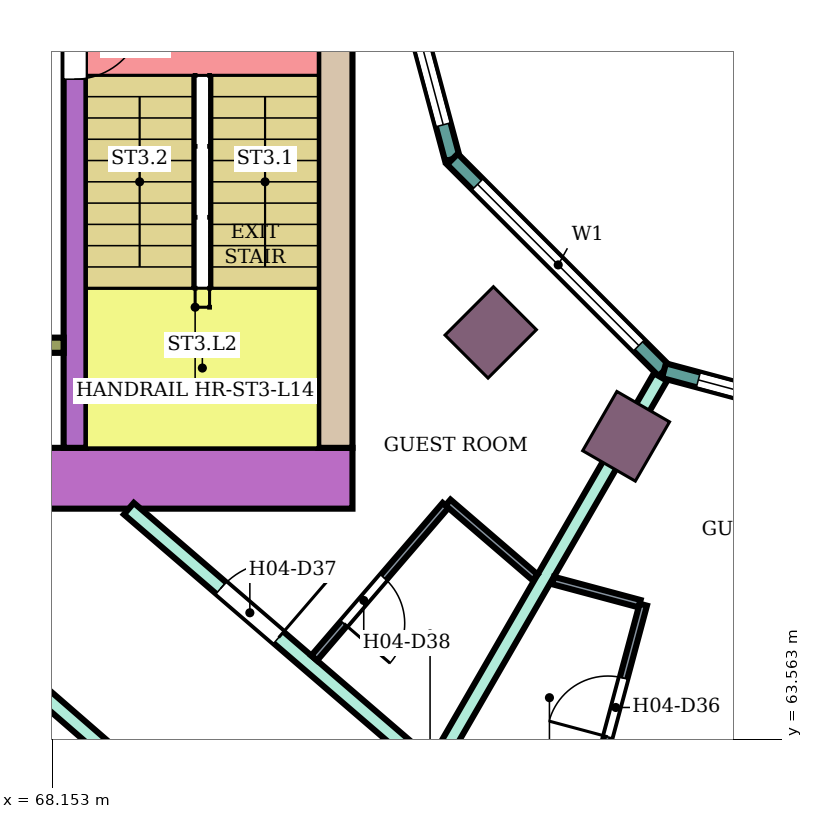
"""IFC4 building model, lengths in metres.
Left out: names, types, materials, properties, quantities, classifications, styles, units other than length and angle.
Written with IfcOpenShell. Run it as: python <this file> out.ifc"""

import sys

from ifc_helpers import new_model, si_unit, direction, frame, frame_2d, origin, origin_2d, place, context, subcontext, project, spatial, rectangle, extrude, element, fill, save


model = new_model("IFC4")
c1 = context("Model", 3, precision=1e-05, world=origin(), true_north=direction((0.0, 1.0)))
c2 = subcontext(c1, "Body", "Model", "MODEL_VIEW")
j1 = project(units=[si_unit("LENGTHUNIT", "METRE"), si_unit("PLANEANGLEUNIT", "RADIAN")], contexts=[c1])
p1 = place(None, origin())
s1 = spatial("IfcSite", under=j1, at=p1, CompositionType="ELEMENT")
p2 = place(p1, origin())
s2 = spatial("IfcBuilding", under=s1, at=p2, CompositionType="ELEMENT")
p3 = place(p2, frame((0.0, 0.0, 63.0)))
s3 = spatial("IfcBuildingStorey", under=s2, at=p3, CompositionType="ELEMENT", Elevation=63.0)
for number, where, z_axis, x_axis in (
    (1, (73.919, 68.919, 0.0), (0.0, 0.0, 1.0), (-0.707, -0.707, 0.0)),
    (2, (75.7, 67.552, 0.0), (0.0, 0.0, 1.0), (-0.5, -0.866, 0.0)),
):
    element("IfcColumn", number, at=place(p3, frame(where, z_axis=z_axis, x_axis=x_axis)), inside=s3, PredefinedType="COLUMN", context=c2, shape_type="SweptSolid", body=[
        extrude(rectangle(XDim=0.9, YDim=0.8, at=origin_2d()), origin(), (0.0, 0.0, 1.0), 3.8),
    ])
p4 = place(p3, frame((72.1, 67.0, 0.0), z_axis=(0.0, 0.0, 1.0), x_axis=(-1.0, 0.0, 0.0)))
e3 = element("IfcWall", 3, at=p4, inside=s3, PredefinedType="SHEAR", context=c2, shape_type="SweptSolid", body=[
    extrude(rectangle(XDim=14.7, YDim=0.8, at=frame_2d((7.35, 0.0))), origin(), (0.0, 0.0, 1.0), 3.48),
])
p5 = place(p4, frame((4.2, 0.0, 0.0)))
e4 = element("IfcOpeningElement", 4, at=p5, cuts=e3, PredefinedType="OPENING", context=c2, shape_type="SweptSolid", body=[
    extrude(rectangle(XDim=2.4, YDim=2.4, at=frame_2d((1.2, 1.2))), frame((0.0, 0.41, 0.0), z_axis=(0.0, -1.0, 0.0), x_axis=(1.0, 0.0, 0.0)), (0.0, 0.0, 1.0), 0.82),
])
p6 = place(p3, frame((71.875, 75.0, 0.0), z_axis=(0.0, 0.0, 1.0), x_axis=(0.0, -1.0, 0.0)))
e5 = element("IfcWall", 5, at=p6, inside=s3, PredefinedType="SHEAR", context=c2, shape_type="SweptSolid", body=[
    extrude(rectangle(XDim=7.6, YDim=0.45, at=frame_2d((3.8, 0.0))), origin(), (0.0, 0.0, 1.0), 3.48),
])
p7 = place(p3, frame((68.45, 75.0, 0.0), z_axis=(0.0, 0.0, 1.0), x_axis=(0.0, -1.0, 0.0)))
e6 = element("IfcWall", 6, at=p7, inside=s3, PredefinedType="SHEAR", context=c2, shape_type="SweptSolid", body=[
    extrude(rectangle(XDim=7.6, YDim=0.3, at=frame_2d((3.8, 0.0))), origin(), (0.0, 0.0, 1.0), 3.48),
])
p8 = place(p7, frame((1.85, 0.0, 0.0)))
e7 = element("IfcOpeningElement", 7, at=p8, cuts=e6, PredefinedType="OPENING", context=c2, shape_type="SweptSolid", body=[
    extrude(rectangle(XDim=0.9, YDim=2.1, at=frame_2d((0.45, 1.05))), frame((0.0, 0.16, 0.0), z_axis=(0.0, -1.0, 0.0), x_axis=(1.0, 0.0, 0.0)), (0.0, 0.0, 1.0), 0.32),
])
p9 = place(p3, frame((68.3, 68.75, 0.0), z_axis=(0.0, 0.0, 1.0), x_axis=(-1.0, 0.0, 0.0)))
e8 = element("IfcWall", 8, at=p9, inside=s3, PredefinedType="SHEAR", context=c2, shape_type="SweptSolid", body=[
    extrude(rectangle(XDim=4.65, YDim=0.2, at=frame_2d((2.325, 0.0))), origin(), (0.0, 0.0, 1.0), 3.48),
])
p10 = place(p3, frame((72.396, 75.0, 0.0), z_axis=(0.0, 0.0, 1.0), x_axis=(0.258789828301, -0.965933654434, 0.0)))
e9 = element("IfcWall", 9, at=p10, inside=s3, PredefinedType="NOTDEFINED", context=c2, shape_type="SweptSolid", body=[
    extrude(rectangle(XDim=3.936, YDim=0.2, at=frame_2d((1.968, 0.0))), origin(), (0.0, 0.0, 1.0), 3.8),
])
p11 = place(p10, frame((0.468, 0.0, 0.9)))
e10 = element("IfcOpeningElement", 10, at=p11, cuts=e9, PredefinedType="OPENING", context=c2, shape_type="SweptSolid", body=[
    extrude(rectangle(XDim=3.0, YDim=2.3, at=frame_2d((1.5, 1.15))), frame((0.0, 0.11, 0.0), z_axis=(0.0, -1.0, 0.0), x_axis=(1.0, 0.0, 0.0)), (0.0, 0.0, 1.0), 0.22),
])
p12 = place(p3, frame((73.415, 71.198, 0.0), z_axis=(0.0, 0.0, 1.0), x_axis=(0.707106781187, -0.707106781187, 0.0)))
e11 = element("IfcWall", 11, at=p12, inside=s3, PredefinedType="NOTDEFINED", context=c2, shape_type="SweptSolid", body=[
    extrude(rectangle(XDim=3.936, YDim=0.2, at=frame_2d((1.968, 0.0))), origin(), (0.0, 0.0, 1.0), 3.8),
])
p13 = place(p12, frame((0.468, 0.0, 0.9)))
e12 = element("IfcOpeningElement", 12, at=p13, cuts=e11, PredefinedType="OPENING", context=c2, shape_type="SweptSolid", body=[
    extrude(rectangle(XDim=3.0, YDim=2.3, at=frame_2d((1.5, 1.15))), frame((0.0, 0.11, 0.0), z_axis=(0.0, -1.0, 0.0), x_axis=(1.0, 0.0, 0.0)), (0.0, 0.0, 1.0), 0.22),
])
p14 = place(p3, frame((76.198, 68.415, 0.0), z_axis=(0.0, 0.0, 1.0), x_axis=(0.965933654434, -0.258789828301, 0.0)))
e13 = element("IfcWall", 13, at=p14, inside=s3, PredefinedType="NOTDEFINED", context=c2, shape_type="SweptSolid", body=[
    extrude(rectangle(XDim=3.936, YDim=0.2, at=frame_2d((1.968, 0.0))), origin(), (0.0, 0.0, 1.0), 3.8),
])
p15 = place(p14, frame((0.468, 0.0, 0.9)))
e14 = element("IfcOpeningElement", 14, at=p15, cuts=e13, PredefinedType="OPENING", context=c2, shape_type="SweptSolid", body=[
    extrude(rectangle(XDim=3.0, YDim=2.3, at=frame_2d((1.5, 1.15))), frame((0.0, 0.11, 0.0), z_axis=(0.0, -1.0, 0.0), x_axis=(1.0, 0.0, 0.0)), (0.0, 0.0, 1.0), 0.22),
])
p16 = place(p3, frame((66.924, 65.111, 0.0), z_axis=(0.0, 0.0, 1.0), x_axis=(0.755023669255, -0.655697536113, 0.0)))
e15 = element("IfcWall", 15, at=p16, inside=s3, PredefinedType="PARTITIONING", context=c2, shape_type="SweptSolid", body=[
    extrude(rectangle(XDim=6.396, YDim=0.2, at=frame_2d((3.198, 0.0))), origin(), (0.0, 0.0, 1.0), 3.35),
])
p17 = place(p16, frame((2.658, 0.0, 0.0)))
e16 = element("IfcOpeningElement", 16, at=p17, cuts=e15, PredefinedType="OPENING", context=c2, shape_type="SweptSolid", body=[
    extrude(rectangle(XDim=1.8, YDim=2.1, at=frame_2d((0.9, 1.05))), frame((0.0, 0.11, 0.0), z_axis=(0.0, -1.0, 0.0), x_axis=(1.0, 0.0, 0.0)), (0.0, 0.0, 1.0), 0.22),
])
p18 = place(p3, frame((69.158, 66.6, 0.0), z_axis=(0.0, 0.0, 1.0), x_axis=(0.757976058094, -0.652282373943, 0.0)))
e17 = element("IfcWall", 17, at=p18, inside=s3, PredefinedType="PARTITIONING", context=c2, shape_type="SweptSolid", body=[
    extrude(rectangle(XDim=5.16, YDim=0.2, at=frame_2d((2.58, 0.0))), origin(), (0.0, 0.0, 1.0), 3.35),
])
p19 = place(p18, frame((1.6, 0.0, 0.0)))
e18 = element("IfcOpeningElement", 18, at=p19, cuts=e17, PredefinedType="OPENING", context=c2, shape_type="SweptSolid", body=[
    extrude(rectangle(XDim=1.0, YDim=2.1, at=frame_2d((0.5, 1.05))), frame((0.0, 0.11, 0.0), z_axis=(0.0, -1.0, 0.0), x_axis=(1.0, 0.0, 0.0)), (0.0, 0.0, 1.0), 0.22),
])
p20 = place(p3, frame((73.174, 63.176, 0.0), z_axis=(0.0, 0.0, 1.0), x_axis=(0.500257106344, 0.865876912472, 0.0)))
e19 = element("IfcWall", 19, at=p20, inside=s3, PredefinedType="PARTITIONING", context=c2, shape_type="SweptSolid", body=[
    extrude(rectangle(XDim=5.955, YDim=0.2, at=frame_2d((2.978, 0.0))), origin(), (0.0, 0.0, 1.0), 3.35),
])
p21 = place(p3, frame((71.596, 64.635, 0.0), z_axis=(0.0, 0.0, 1.0), x_axis=(0.652285007511, 0.757973791748, 0.0)))
e20 = element("IfcWall", 20, at=p21, inside=s3, PredefinedType="PARTITIONING", context=c2, shape_type="SweptSolid", body=[
    extrude(rectangle(XDim=2.65, YDim=0.1, at=frame_2d((1.325, 0.0))), origin(), (0.0, 0.0, 1.0), 3.35),
])
p22 = place(p21, frame((0.6, 0.0, 0.0)))
e21 = element("IfcOpeningElement", 21, at=p22, cuts=e20, PredefinedType="OPENING", context=c2, shape_type="SweptSolid", body=[
    extrude(rectangle(XDim=0.8, YDim=2.1, at=frame_2d((0.4, 1.05))), frame((0.0, 0.06, 0.0), z_axis=(0.0, -1.0, 0.0), x_axis=(1.0, 0.0, 0.0)), (0.0, 0.0, 1.0), 0.12),
])
p23 = place(p3, frame((73.357, 66.681, 0.0), z_axis=(0.0, 0.0, 1.0), x_axis=(0.758263469747, -0.651948242154, 0.0)))
e22 = element("IfcWall", 22, at=p23, inside=s3, PredefinedType="PARTITIONING", context=c2, shape_type="SweptSolid", body=[
    extrude(rectangle(XDim=1.511, YDim=0.1, at=frame_2d((0.755, 0.0))), origin(), (0.0, 0.0, 1.0), 3.35),
])
p24 = place(p3, frame((74.739, 65.655, 0.0), z_axis=(0.0, 0.0, 1.0), x_axis=(0.96591107063, -0.258874107695, 0.0)))
e23 = element("IfcWall", 23, at=p24, inside=s3, PredefinedType="PARTITIONING", context=c2, shape_type="SweptSolid", body=[
    extrude(rectangle(XDim=1.179, YDim=0.1, at=frame_2d((0.589, 0.0))), origin(), (0.0, 0.0, 1.0), 3.35),
])
p25 = place(p3, frame((75.227, 62.729, 0.0), z_axis=(0.0, 0.0, 1.0), x_axis=(0.258945475746, 0.965891940432, 0.0)))
e24 = element("IfcWall", 24, at=p25, inside=s3, PredefinedType="PARTITIONING", context=c2, shape_type="SweptSolid", body=[
    extrude(rectangle(XDim=2.7, YDim=0.1, at=frame_2d((1.35, 0.0))), origin(), (0.0, 0.0, 1.0), 3.35),
])
p26 = place(p25, frame((0.9, 0.0, 0.0)))
e25 = element("IfcOpeningElement", 25, at=p26, cuts=e24, PredefinedType="OPENING", context=c2, shape_type="SweptSolid", body=[
    extrude(rectangle(XDim=0.8, YDim=2.1, at=frame_2d((0.4, 1.05))), frame((0.0, 0.06, 0.0), z_axis=(0.0, -1.0, 0.0), x_axis=(1.0, 0.0, 0.0)), (0.0, 0.0, 1.0), 0.12),
])
p27 = place(p11, origin())
e26 = element("IfcWindow", 26, at=p27, inside=s3, PartitioningType="SINGLE_PANEL", PredefinedType="WINDOW", context=c2, shape_type="SweptSolid", body=[
    extrude(rectangle(XDim=3.0, YDim=2.3, at=frame_2d((1.5, 1.15))), frame((0.0, 0.03, 0.0), z_axis=(0.0, -1.0, 0.0), x_axis=(1.0, 0.0, 0.0)), (0.0, 0.0, 1.0), 0.06),
])
fill(e10, e26)
p28 = place(p13, origin())
e27 = element("IfcWindow", 27, at=p28, inside=s3, PartitioningType="SINGLE_PANEL", PredefinedType="WINDOW", context=c2, shape_type="SweptSolid", body=[
    extrude(rectangle(XDim=3.0, YDim=2.3, at=frame_2d((1.5, 1.15))), frame((0.0, 0.03, 0.0), z_axis=(0.0, -1.0, 0.0), x_axis=(1.0, 0.0, 0.0)), (0.0, 0.0, 1.0), 0.06),
])
fill(e12, e27)
p29 = place(p15, origin())
e28 = element("IfcWindow", 28, at=p29, inside=s3, PartitioningType="SINGLE_PANEL", PredefinedType="WINDOW", context=c2, shape_type="SweptSolid", body=[
    extrude(rectangle(XDim=3.0, YDim=2.3, at=frame_2d((1.5, 1.15))), frame((0.0, 0.03, 0.0), z_axis=(0.0, -1.0, 0.0), x_axis=(1.0, 0.0, 0.0)), (0.0, 0.0, 1.0), 0.06),
])
fill(e14, e28)
p30 = place(p26, origin())
e29 = element("IfcDoor", 29, at=p30, inside=s3, OperationType="SINGLE_SWING_LEFT", PredefinedType="DOOR", context=c2, shape_type="SweptSolid", body=[
    extrude(rectangle(XDim=0.8, YDim=2.1, at=frame_2d((0.4, 1.05))), frame((0.0, 0.025, 0.0), z_axis=(0.0, -1.0, 0.0), x_axis=(1.0, 0.0, 0.0)), (0.0, 0.0, 1.0), 0.05),
])
fill(e25, e29)
p31 = place(p19, origin())
e30 = element("IfcDoor", 30, at=p31, inside=s3, OperationType="SINGLE_SWING_RIGHT", PredefinedType="DOOR", context=c2, shape_type="SweptSolid", body=[
    extrude(rectangle(XDim=1.0, YDim=2.1, at=frame_2d((0.5, 1.05))), frame((0.0, 0.025, 0.0), z_axis=(0.0, -1.0, 0.0), x_axis=(1.0, 0.0, 0.0)), (0.0, 0.0, 1.0), 0.05),
])
fill(e18, e30)
p32 = place(p22, frame((0.8, 0.0, 0.0), z_axis=(0.0, 0.0, 1.0), x_axis=(-1.0, 0.0, 0.0)))
e31 = element("IfcDoor", 31, at=p32, inside=s3, OperationType="SINGLE_SWING_RIGHT", PredefinedType="DOOR", context=c2, shape_type="SweptSolid", body=[
    extrude(rectangle(XDim=0.8, YDim=2.1, at=frame_2d((0.4, 1.05))), frame((0.0, 0.025, 0.0), z_axis=(0.0, -1.0, 0.0), x_axis=(1.0, 0.0, 0.0)), (0.0, 0.0, 1.0), 0.05),
])
fill(e21, e31)
p33 = place(p8, origin())
e32 = element("IfcDoor", 32, at=p33, inside=s3, OperationType="SINGLE_SWING_LEFT", PredefinedType="DOOR", context=c2, shape_type="SweptSolid", body=[
    extrude(rectangle(XDim=0.9, YDim=2.1, at=frame_2d((0.45, 1.05))), frame((0.0, 0.025, 0.0), z_axis=(0.0, -1.0, 0.0), x_axis=(1.0, 0.0, 0.0)), (0.0, 0.0, 1.0), 0.05),
])
fill(e7, e32)
save(model, sys.argv[1])
